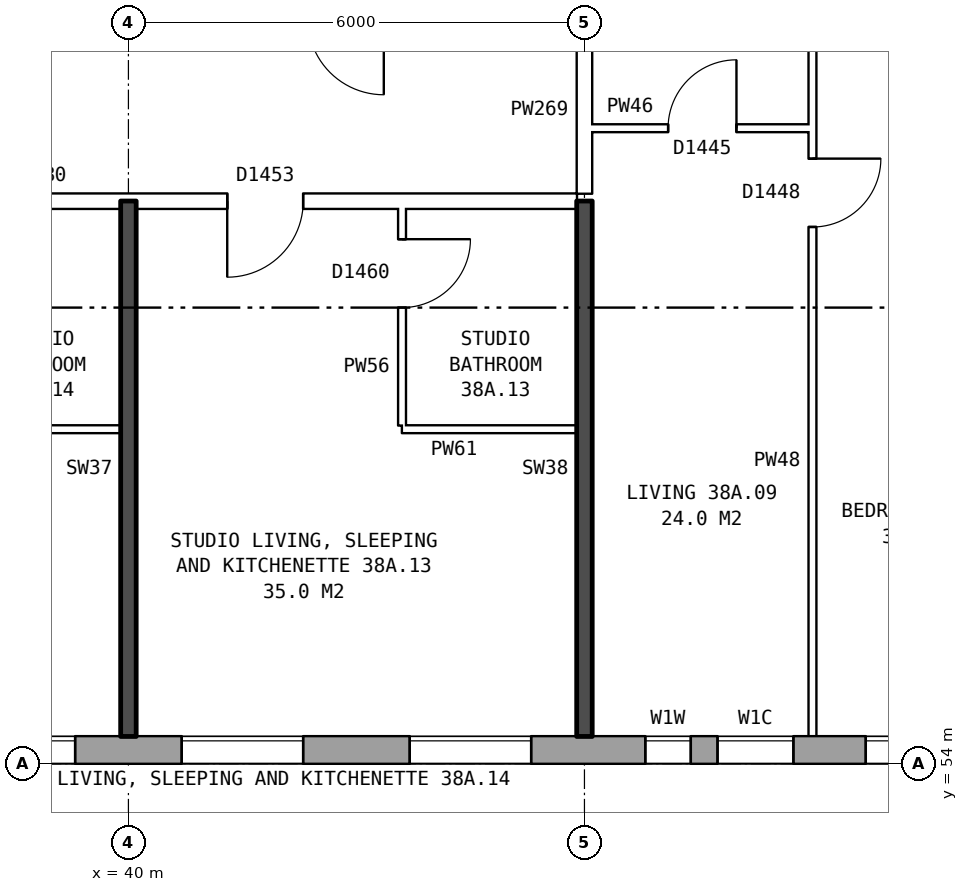
"""IFC4 building model, lengths in metres.
Left out: names, types, materials, properties, quantities, classifications, styles, units other than length and angle.
Written with IfcOpenShell. Run it as: python <this file> out.ifc"""

import sys

from ifc_helpers import new_model, si_unit, direction, frame, frame_2d, origin, place, context, subcontext, project, spatial, rectangle, extrude, element, fill, save


model = new_model("IFC4")
c1 = context("Model", 3, precision=1e-05, world=origin(), true_north=direction((0.0, 1.0)))
c2 = subcontext(c1, "Body", "Model", "MODEL_VIEW")
j1 = project(units=[si_unit("LENGTHUNIT", "METRE"), si_unit("PLANEANGLEUNIT", "RADIAN")], contexts=[c1])
p1 = place(None, origin())
s1 = spatial("IfcSite", under=j1, at=p1, CompositionType="ELEMENT")
p2 = place(p1, origin())
s2 = spatial("IfcBuilding", under=s1, at=p2, CompositionType="ELEMENT")
p3 = place(p2, frame((0.0, 0.0, 136.1)))
s3 = spatial("IfcBuildingStorey", under=s2, at=p3, CompositionType="ELEMENT", Elevation=136.1)
p4 = place(p3, frame((29.825, 54.18, 0.0), z_axis=(0.0, 0.0, 1.0), x_axis=(1.0, 0.0, 0.0)))
e1 = element("IfcWall", 1, at=p4, inside=s3, PredefinedType="STANDARD", context=c2, shape_type="SweptSolid", body=[
    extrude(rectangle(XDim=43.101, YDim=0.36, at=frame_2d((21.55, 0.0))), origin(), (0.0, 0.0, 1.0), 2.85),
])
p5 = place(p4, frame((1.875, 0.0, 0.8)))
e2 = element("IfcOpeningElement", 2, at=p5, cuts=e1, PredefinedType="OPENING", context=c2, shape_type="SweptSolid", body=[
    extrude(rectangle(XDim=1.6, YDim=1.8, at=frame_2d((0.8, 0.9))), frame((0.0, 0.19, 0.0), z_axis=(0.0, -1.0, 0.0), x_axis=(1.0, 0.0, 0.0)), (0.0, 0.0, 1.0), 0.38),
])
p6 = place(p4, frame((4.875, 0.0, 0.8)))
e3 = element("IfcOpeningElement", 3, at=p6, cuts=e1, PredefinedType="OPENING", context=c2, shape_type="SweptSolid", body=[
    extrude(rectangle(XDim=1.6, YDim=1.8, at=frame_2d((0.8, 0.9))), frame((0.0, 0.19, 0.0), z_axis=(0.0, -1.0, 0.0), x_axis=(1.0, 0.0, 0.0)), (0.0, 0.0, 1.0), 0.38),
])
p7 = place(p4, frame((7.875, 0.0, 0.8)))
e4 = element("IfcOpeningElement", 4, at=p7, cuts=e1, PredefinedType="OPENING", context=c2, shape_type="SweptSolid", body=[
    extrude(rectangle(XDim=1.6, YDim=1.8, at=frame_2d((0.8, 0.9))), frame((0.0, 0.19, 0.0), z_axis=(0.0, -1.0, 0.0), x_axis=(1.0, 0.0, 0.0)), (0.0, 0.0, 1.0), 0.38),
])
p8 = place(p4, frame((10.875, 0.0, 0.8)))
e5 = element("IfcOpeningElement", 5, at=p8, cuts=e1, PredefinedType="OPENING", context=c2, shape_type="SweptSolid", body=[
    extrude(rectangle(XDim=1.6, YDim=1.8, at=frame_2d((0.8, 0.9))), frame((0.0, 0.19, 0.0), z_axis=(0.0, -1.0, 0.0), x_axis=(1.0, 0.0, 0.0)), (0.0, 0.0, 1.0), 0.38),
])
p9 = place(p4, frame((13.875, 0.0, 0.8)))
e6 = element("IfcOpeningElement", 6, at=p9, cuts=e1, PredefinedType="OPENING", context=c2, shape_type="SweptSolid", body=[
    extrude(rectangle(XDim=1.6, YDim=1.8, at=frame_2d((0.8, 0.9))), frame((0.0, 0.19, 0.0), z_axis=(0.0, -1.0, 0.0), x_axis=(1.0, 0.0, 0.0)), (0.0, 0.0, 1.0), 0.38),
])
p10 = place(p4, frame((16.975, 0.0, 0.15)))
e7 = element("IfcOpeningElement", 7, at=p10, cuts=e1, PredefinedType="OPENING", context=c2, shape_type="SweptSolid", body=[
    extrude(rectangle(XDim=0.6, YDim=0.9, at=frame_2d((0.3, 0.45))), frame((0.0, 0.19, 0.0), z_axis=(0.0, -1.0, 0.0), x_axis=(1.0, 0.0, 0.0)), (0.0, 0.0, 1.0), 0.38),
])
p11 = place(p4, frame((19.875, 0.0, 0.8)))
e8 = element("IfcOpeningElement", 8, at=p11, cuts=e1, PredefinedType="OPENING", context=c2, shape_type="SweptSolid", body=[
    extrude(rectangle(XDim=1.6, YDim=1.8, at=frame_2d((0.8, 0.9))), frame((0.0, 0.19, 0.0), z_axis=(0.0, -1.0, 0.0), x_axis=(1.0, 0.0, 0.0)), (0.0, 0.0, 1.0), 0.38),
])
p12 = place(p4, frame((22.875, 0.0, 0.8)))
e9 = element("IfcOpeningElement", 9, at=p12, cuts=e1, PredefinedType="OPENING", context=c2, shape_type="SweptSolid", body=[
    extrude(rectangle(XDim=1.6, YDim=1.8, at=frame_2d((0.8, 0.9))), frame((0.0, 0.19, 0.0), z_axis=(0.0, -1.0, 0.0), x_axis=(1.0, 0.0, 0.0)), (0.0, 0.0, 1.0), 0.38),
])
p13 = place(p4, frame((25.325, 0.0, 0.15)))
e10 = element("IfcOpeningElement", 10, at=p13, cuts=e1, PredefinedType="OPENING", context=c2, shape_type="SweptSolid", body=[
    extrude(rectangle(XDim=0.8, YDim=0.9, at=frame_2d((0.4, 0.45))), frame((0.0, 0.19, 0.0), z_axis=(0.0, -1.0, 0.0), x_axis=(1.0, 0.0, 0.0)), (0.0, 0.0, 1.0), 0.38),
])
p14 = place(p4, frame((28.875, 0.0, 0.8)))
e11 = element("IfcOpeningElement", 11, at=p14, cuts=e1, PredefinedType="OPENING", context=c2, shape_type="SweptSolid", body=[
    extrude(rectangle(XDim=1.6, YDim=1.8, at=frame_2d((0.8, 0.9))), frame((0.0, 0.19, 0.0), z_axis=(0.0, -1.0, 0.0), x_axis=(1.0, 0.0, 0.0)), (0.0, 0.0, 1.0), 0.38),
])
p15 = place(p4, frame((31.875, 0.0, 0.8)))
e12 = element("IfcOpeningElement", 12, at=p15, cuts=e1, PredefinedType="OPENING", context=c2, shape_type="SweptSolid", body=[
    extrude(rectangle(XDim=1.6, YDim=1.8, at=frame_2d((0.8, 0.9))), frame((0.0, 0.19, 0.0), z_axis=(0.0, -1.0, 0.0), x_axis=(1.0, 0.0, 0.0)), (0.0, 0.0, 1.0), 0.38),
])
p16 = place(p4, frame((34.875, 0.0, 0.8)))
e13 = element("IfcOpeningElement", 13, at=p16, cuts=e1, PredefinedType="OPENING", context=c2, shape_type="SweptSolid", body=[
    extrude(rectangle(XDim=1.6, YDim=1.8, at=frame_2d((0.8, 0.9))), frame((0.0, 0.19, 0.0), z_axis=(0.0, -1.0, 0.0), x_axis=(1.0, 0.0, 0.0)), (0.0, 0.0, 1.0), 0.38),
])
p17 = place(p4, frame((37.875, 0.0, 0.8)))
e14 = element("IfcOpeningElement", 14, at=p17, cuts=e1, PredefinedType="OPENING", context=c2, shape_type="SweptSolid", body=[
    extrude(rectangle(XDim=1.6, YDim=1.8, at=frame_2d((0.8, 0.9))), frame((0.0, 0.19, 0.0), z_axis=(0.0, -1.0, 0.0), x_axis=(1.0, 0.0, 0.0)), (0.0, 0.0, 1.0), 0.38),
])
p18 = place(p4, frame((40.875, 0.0, 0.8)))
e15 = element("IfcOpeningElement", 15, at=p18, cuts=e1, PredefinedType="OPENING", context=c2, shape_type="SweptSolid", body=[
    extrude(rectangle(XDim=1.6, YDim=1.8, at=frame_2d((0.8, 0.9))), frame((0.0, 0.19, 0.0), z_axis=(0.0, -1.0, 0.0), x_axis=(1.0, 0.0, 0.0)), (0.0, 0.0, 1.0), 0.38),
])
p19 = place(p4, frame((17.925, 0.0, 0.15)))
e16 = element("IfcOpeningElement", 16, at=p19, cuts=e1, PredefinedType="OPENING", context=c2, shape_type="SweptSolid", body=[
    extrude(rectangle(XDim=1.0, YDim=1.8, at=frame_2d((0.5, 0.9))), frame((0.0, 0.19, 0.0), z_axis=(0.0, -1.0, 0.0), x_axis=(1.0, 0.0, 0.0)), (0.0, 0.0, 1.0), 0.38),
])
p20 = place(p4, frame((26.975, 0.0, 1.35)))
e17 = element("IfcOpeningElement", 17, at=p20, cuts=e1, PredefinedType="OPENING", context=c2, shape_type="SweptSolid", body=[
    extrude(rectangle(XDim=1.0, YDim=1.2, at=frame_2d((0.5, 0.6))), frame((0.0, 0.19, 0.0), z_axis=(0.0, -1.0, 0.0), x_axis=(1.0, 0.0, 0.0)), (0.0, 0.0, 1.0), 0.38),
])
for number, where, z_axis, x_axis in (
    (18, (37.6, 58.4, 0.0), (0.0, 0.0, 1.0), (1.0, 0.0, 0.0)),
    (19, (43.6, 58.4, 0.0), (0.0, 0.0, 1.0), (1.0, 0.0, 0.0)),
):
    element("IfcWall", number, at=place(p3, frame(where, z_axis=z_axis, x_axis=x_axis)), inside=s3, PredefinedType="PARTITIONING", context=c2, shape_type="SweptSolid", body=[
        extrude(rectangle(XDim=2.3, YDim=0.1, at=frame_2d((1.15, 0.0))), origin(), (0.0, 0.0, 1.0), 2.85),
    ])
p21 = place(p3, frame((27.11, 61.4, 0.0), z_axis=(0.0, 0.0, 1.0), x_axis=(1.0, 0.0, 0.0)))
e20 = element("IfcWall", 20, at=p21, inside=s3, PredefinedType="PARTITIONING", context=c2, shape_type="SweptSolid", body=[
    extrude(rectangle(XDim=18.79, YDim=0.2, at=frame_2d((9.395, 0.0))), origin(), (0.0, 0.0, 1.0), 2.85),
])
p22 = place(p21, frame((14.19, 0.0, 0.0)))
e21 = element("IfcOpeningElement", 21, at=p22, cuts=e20, PredefinedType="OPENING", context=c2, shape_type="SweptSolid", body=[
    extrude(rectangle(XDim=1.0, YDim=2.1, at=frame_2d((0.5, 1.05))), frame((0.0, 0.11, 0.0), z_axis=(0.0, -1.0, 0.0), x_axis=(1.0, 0.0, 0.0)), (0.0, 0.0, 1.0), 0.22),
])
p23 = place(p21, frame((8.19, 0.0, 0.0)))
e22 = element("IfcOpeningElement", 22, at=p23, cuts=e20, PredefinedType="OPENING", context=c2, shape_type="SweptSolid", body=[
    extrude(rectangle(XDim=1.0, YDim=2.1, at=frame_2d((0.5, 1.05))), frame((0.0, 0.11, 0.0), z_axis=(0.0, -1.0, 0.0), x_axis=(1.0, 0.0, 0.0)), (0.0, 0.0, 1.0), 0.22),
])
p24 = place(p21, frame((4.59, 0.0, 0.0)))
e23 = element("IfcOpeningElement", 23, at=p24, cuts=e20, PredefinedType="OPENING", context=c2, shape_type="SweptSolid", body=[
    extrude(rectangle(XDim=1.0, YDim=2.1, at=frame_2d((0.5, 1.05))), frame((0.0, 0.11, 0.0), z_axis=(0.0, -1.0, 0.0), x_axis=(1.0, 0.0, 0.0)), (0.0, 0.0, 1.0), 0.22),
])
p25 = place(p3, frame((46.1, 62.36, 0.0), z_axis=(0.0, 0.0, 1.0), x_axis=(1.0, 0.0, 0.0)))
e24 = element("IfcWall", 24, at=p25, inside=s3, PredefinedType="PARTITIONING", context=c2, shape_type="SweptSolid", body=[
    extrude(rectangle(XDim=2.9, YDim=0.1, at=frame_2d((1.45, 0.0))), origin(), (0.0, 0.0, 1.0), 2.85),
])
p26 = place(p25, frame((1.0, 0.0, 0.0)))
e25 = element("IfcOpeningElement", 25, at=p26, cuts=e24, PredefinedType="OPENING", context=c2, shape_type="SweptSolid", body=[
    extrude(rectangle(XDim=0.9, YDim=2.1, at=frame_2d((0.45, 1.05))), frame((0.0, 0.06, 0.0), z_axis=(0.0, -1.0, 0.0), x_axis=(1.0, 0.0, 0.0)), (0.0, 0.0, 1.0), 0.12),
])
p27 = place(p3, frame((40.0, 54.36, 0.0), z_axis=(0.0, 0.0, 1.0), x_axis=(0.0, 1.0, 0.0)))
e26 = element("IfcWall", 26, at=p27, inside=s3, PredefinedType="SOLIDWALL", context=c2, shape_type="SweptSolid", body=[
    extrude(rectangle(XDim=7.04, YDim=0.2, at=frame_2d((3.52, 0.0))), origin(), (0.0, 0.0, 1.0), 2.85),
])
p28 = place(p3, frame((43.6, 58.45, 0.0), z_axis=(0.0, 0.0, 1.0), x_axis=(0.0, 1.0, 0.0)))
e27 = element("IfcWall", 27, at=p28, inside=s3, PredefinedType="PARTITIONING", context=c2, shape_type="SweptSolid", body=[
    extrude(rectangle(XDim=2.85, YDim=0.1, at=frame_2d((1.425, 0.0))), origin(), (0.0, 0.0, 1.0), 2.85),
])
p29 = place(p28, frame((1.55, 0.0, 0.0)))
e28 = element("IfcOpeningElement", 28, at=p29, cuts=e27, PredefinedType="OPENING", context=c2, shape_type="SweptSolid", body=[
    extrude(rectangle(XDim=0.9, YDim=2.1, at=frame_2d((0.45, 1.05))), frame((0.0, 0.06, 0.0), z_axis=(0.0, -1.0, 0.0), x_axis=(1.0, 0.0, 0.0)), (0.0, 0.0, 1.0), 0.12),
])
p30 = place(p3, frame((46.0, 54.36, 0.0), z_axis=(0.0, 0.0, 1.0), x_axis=(0.0, 1.0, 0.0)))
e29 = element("IfcWall", 29, at=p30, inside=s3, PredefinedType="SOLIDWALL", context=c2, shape_type="SweptSolid", body=[
    extrude(rectangle(XDim=7.04, YDim=0.2, at=frame_2d((3.52, 0.0))), origin(), (0.0, 0.0, 1.0), 2.85),
])
p31 = place(p3, frame((46.0, 61.5, 0.0), z_axis=(0.0, 0.0, 1.0), x_axis=(0.0, 1.0, 0.0)))
e30 = element("IfcWall", 30, at=p31, inside=s3, PredefinedType="PARTITIONING", context=c2, shape_type="SweptSolid", body=[
    extrude(rectangle(XDim=2.2, YDim=0.2, at=frame_2d((1.1, 0.0))), origin(), (0.0, 0.0, 1.0), 2.85),
])
p32 = place(p3, frame((49.0, 54.36, 0.0), z_axis=(0.0, 0.0, 1.0), x_axis=(0.0, 1.0, 0.0)))
e31 = element("IfcWall", 31, at=p32, inside=s3, PredefinedType="PARTITIONING", context=c2, shape_type="SweptSolid", body=[
    extrude(rectangle(XDim=14.34, YDim=0.1, at=frame_2d((7.17, 0.0))), origin(), (0.0, 0.0, 1.0), 2.85),
])
p33 = place(p32, frame((6.7, 0.0, 0.0)))
e32 = element("IfcOpeningElement", 32, at=p33, cuts=e31, PredefinedType="OPENING", context=c2, shape_type="SweptSolid", body=[
    extrude(rectangle(XDim=0.9, YDim=2.1, at=frame_2d((0.45, 1.05))), frame((0.0, 0.06, 0.0), z_axis=(0.0, -1.0, 0.0), x_axis=(1.0, 0.0, 0.0)), (0.0, 0.0, 1.0), 0.12),
])
p34 = place(p32, frame((13.04, 0.0, 0.0)))
e33 = element("IfcOpeningElement", 33, at=p34, cuts=e31, PredefinedType="OPENING", context=c2, shape_type="SweptSolid", body=[
    extrude(rectangle(XDim=0.9, YDim=2.1, at=frame_2d((0.45, 1.05))), frame((0.0, 0.06, 0.0), z_axis=(0.0, -1.0, 0.0), x_axis=(1.0, 0.0, 0.0)), (0.0, 0.0, 1.0), 0.12),
])
p35 = place(p7, origin())
e34 = element("IfcWindow", 34, at=p35, inside=s3, PartitioningType="SINGLE_PANEL", PredefinedType="WINDOW", context=c2, shape_type="SweptSolid", body=[
    extrude(rectangle(XDim=1.6, YDim=1.8, at=frame_2d((0.8, 0.9))), frame((0.0, 0.15, 0.0), z_axis=(0.0, -1.0, 0.0), x_axis=(1.0, 0.0, 0.0)), (0.0, 0.0, 1.0), 0.06),
])
fill(e4, e34)
p36 = place(p8, origin())
e35 = element("IfcWindow", 35, at=p36, inside=s3, PartitioningType="SINGLE_PANEL", PredefinedType="WINDOW", context=c2, shape_type="SweptSolid", body=[
    extrude(rectangle(XDim=1.6, YDim=1.8, at=frame_2d((0.8, 0.9))), frame((0.0, 0.15, 0.0), z_axis=(0.0, -1.0, 0.0), x_axis=(1.0, 0.0, 0.0)), (0.0, 0.0, 1.0), 0.06),
])
fill(e5, e35)
p37 = place(p9, origin())
e36 = element("IfcWindow", 36, at=p37, inside=s3, PartitioningType="SINGLE_PANEL", PredefinedType="WINDOW", context=c2, shape_type="SweptSolid", body=[
    extrude(rectangle(XDim=1.6, YDim=1.8, at=frame_2d((0.8, 0.9))), frame((0.0, 0.15, 0.0), z_axis=(0.0, -1.0, 0.0), x_axis=(1.0, 0.0, 0.0)), (0.0, 0.0, 1.0), 0.06),
])
fill(e6, e36)
p38 = place(p10, origin())
e37 = element("IfcWindow", 37, at=p38, inside=s3, PartitioningType="SINGLE_PANEL", PredefinedType="WINDOW", context=c2, shape_type="SweptSolid", body=[
    extrude(rectangle(XDim=0.6, YDim=0.9, at=frame_2d((0.3, 0.45))), frame((0.0, 0.15, 0.0), z_axis=(0.0, -1.0, 0.0), x_axis=(1.0, 0.0, 0.0)), (0.0, 0.0, 1.0), 0.06),
])
fill(e7, e37)
p39 = place(p11, origin())
e38 = element("IfcWindow", 38, at=p39, inside=s3, PartitioningType="SINGLE_PANEL", PredefinedType="WINDOW", context=c2, shape_type="SweptSolid", body=[
    extrude(rectangle(XDim=1.6, YDim=1.8, at=frame_2d((0.8, 0.9))), frame((0.0, 0.15, 0.0), z_axis=(0.0, -1.0, 0.0), x_axis=(1.0, 0.0, 0.0)), (0.0, 0.0, 1.0), 0.06),
])
fill(e8, e38)
p40 = place(p33, frame((0.9, 0.0, 0.0), z_axis=(0.0, 0.0, 1.0), x_axis=(-1.0, 0.0, 0.0)))
e39 = element("IfcDoor", 39, at=p40, inside=s3, OperationType="SINGLE_SWING_LEFT", PredefinedType="DOOR", context=c2, shape_type="SweptSolid", body=[
    extrude(rectangle(XDim=0.9, YDim=2.1, at=frame_2d((0.45, 1.05))), frame((0.0, 0.025, 0.0), z_axis=(0.0, -1.0, 0.0), x_axis=(1.0, 0.0, 0.0)), (0.0, 0.0, 1.0), 0.05),
])
fill(e32, e39)
p41 = place(p26, origin())
e40 = element("IfcDoor", 40, at=p41, inside=s3, OperationType="SINGLE_SWING_RIGHT", PredefinedType="DOOR", context=c2, shape_type="SweptSolid", body=[
    extrude(rectangle(XDim=0.9, YDim=2.1, at=frame_2d((0.45, 1.05))), frame((0.0, 0.025, 0.0), z_axis=(0.0, -1.0, 0.0), x_axis=(1.0, 0.0, 0.0)), (0.0, 0.0, 1.0), 0.05),
])
fill(e25, e40)
p42 = place(p22, frame((1.0, 0.0, 0.0), z_axis=(0.0, 0.0, 1.0), x_axis=(-1.0, 0.0, 0.0)))
e41 = element("IfcDoor", 41, at=p42, inside=s3, OperationType="SINGLE_SWING_RIGHT", PredefinedType="DOOR", context=c2, shape_type="SweptSolid", body=[
    extrude(rectangle(XDim=1.0, YDim=2.1, at=frame_2d((0.5, 1.05))), frame((0.0, 0.025, 0.0), z_axis=(0.0, -1.0, 0.0), x_axis=(1.0, 0.0, 0.0)), (0.0, 0.0, 1.0), 0.05),
])
fill(e21, e41)
p43 = place(p29, frame((0.9, 0.0, 0.0), z_axis=(0.0, 0.0, 1.0), x_axis=(-1.0, 0.0, 0.0)))
e42 = element("IfcDoor", 42, at=p43, inside=s3, OperationType="SINGLE_SWING_LEFT", PredefinedType="DOOR", context=c2, shape_type="SweptSolid", body=[
    extrude(rectangle(XDim=0.9, YDim=2.1, at=frame_2d((0.45, 1.05))), frame((0.0, 0.025, 0.0), z_axis=(0.0, -1.0, 0.0), x_axis=(1.0, 0.0, 0.0)), (0.0, 0.0, 1.0), 0.05),
])
fill(e28, e42)
p44 = place(p19, origin())
e43 = element("IfcWindow", 43, at=p44, inside=s3, PartitioningType="SINGLE_PANEL", PredefinedType="WINDOW", context=c2, shape_type="SweptSolid", body=[
    extrude(rectangle(XDim=1.0, YDim=1.8, at=frame_2d((0.5, 0.9))), frame((0.0, 0.15, 0.0), z_axis=(0.0, -1.0, 0.0), x_axis=(1.0, 0.0, 0.0)), (0.0, 0.0, 1.0), 0.06),
])
fill(e16, e43)
save(model, sys.argv[1])
